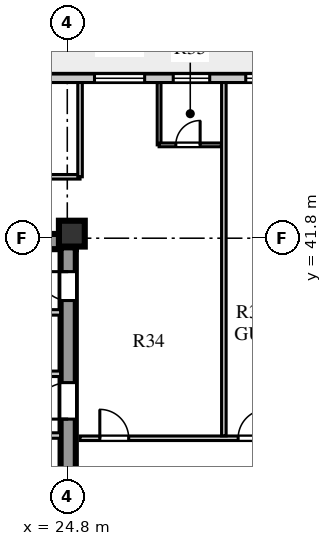
"""IFC4 building model, lengths in metres.
Left out: names, types, materials, properties, quantities, classifications, styles, units other than length and angle.
Written with IfcOpenShell. Run it as: python <this file> out.ifc"""

import sys

from ifc_helpers import new_model, si_unit, direction, frame, frame_2d, origin, origin_2d, place, context, subcontext, project, spatial, rectangle, extrude, element, fill, save


model = new_model("IFC4")
c1 = context("Model", 3, precision=1e-05, world=origin(), true_north=direction((0.0, 1.0)))
c2 = subcontext(c1, "Body", "Model", "MODEL_VIEW")
j1 = project(units=[si_unit("LENGTHUNIT", "METRE"), si_unit("PLANEANGLEUNIT", "RADIAN")], contexts=[c1])
p1 = place(None, origin())
s1 = spatial("IfcSite", under=j1, at=p1, CompositionType="ELEMENT")
p2 = place(p1, origin())
s2 = spatial("IfcBuilding", under=s1, at=p2, CompositionType="ELEMENT")
p3 = place(p2, frame((0.0, 0.0, 134.8)))
s3 = spatial("IfcBuildingStorey", under=s2, at=p3, CompositionType="ELEMENT", Elevation=134.8)
p4 = place(p3, frame((15.4, 41.69, 0.0), z_axis=(0.0, 0.0, 1.0), x_axis=(1.0, 0.0, 0.0)))
e1 = element("IfcWall", 1, at=p4, inside=s3, PredefinedType="SHEAR", context=c2, shape_type="SweptSolid", body=[
    extrude(rectangle(XDim=9.68, YDim=0.5, at=frame_2d((4.84, 0.0))), origin(), (0.0, 0.0, 1.0), 3.6),
])
p5 = place(p3, frame((24.83, 15.74, 0.0), z_axis=(0.0, 0.0, 1.0), x_axis=(0.0, 1.0, 0.0)))
e2 = element("IfcWall", 2, at=p5, inside=s3, PredefinedType="SHEAR", context=c2, shape_type="SweptSolid", body=[
    extrude(rectangle(XDim=25.76, YDim=0.5, at=frame_2d((12.88, 0.0))), origin(), (0.0, 0.0, 1.0), 3.6),
])
p6 = place(p5, frame((1.61, 0.0, 0.0)))
e3 = element("IfcOpeningElement", 3, at=p6, cuts=e2, PredefinedType="OPENING", context=c2, shape_type="SweptSolid", body=[
    extrude(rectangle(XDim=1.2, YDim=2.1, at=frame_2d((0.6, 1.05))), frame((0.0, 0.26, 0.0), z_axis=(0.0, -1.0, 0.0), x_axis=(1.0, 0.0, 0.0)), (0.0, 0.0, 1.0), 0.52),
])
p7 = place(p5, frame((6.78, 0.0, 0.0)))
e4 = element("IfcOpeningElement", 4, at=p7, cuts=e2, PredefinedType="OPENING", context=c2, shape_type="SweptSolid", body=[
    extrude(rectangle(XDim=0.85, YDim=2.06, at=frame_2d((0.425, 1.03))), frame((0.0, 0.26, 0.0), z_axis=(0.0, -1.0, 0.0), x_axis=(1.0, 0.0, 0.0)), (0.0, 0.0, 1.0), 0.52),
])
p8 = place(p5, frame((12.11, 0.0, 0.0)))
e5 = element("IfcOpeningElement", 5, at=p8, cuts=e2, PredefinedType="OPENING", context=c2, shape_type="SweptSolid", body=[
    extrude(rectangle(XDim=1.5, YDim=2.12, at=frame_2d((0.75, 1.06))), frame((0.0, 0.26, 0.0), z_axis=(0.0, -1.0, 0.0), x_axis=(1.0, 0.0, 0.0)), (0.0, 0.0, 1.0), 0.52),
])
p9 = place(p5, frame((20.11, 0.0, 0.0)))
e6 = element("IfcOpeningElement", 6, at=p9, cuts=e2, PredefinedType="OPENING", context=c2, shape_type="SweptSolid", body=[
    extrude(rectangle(XDim=1.2, YDim=2.12, at=frame_2d((0.6, 1.06))), frame((0.0, 0.26, 0.0), z_axis=(0.0, -1.0, 0.0), x_axis=(1.0, 0.0, 0.0)), (0.0, 0.0, 1.0), 0.52),
])
p10 = place(p5, frame((24.01, 0.0, 0.0)))
e7 = element("IfcOpeningElement", 7, at=p10, cuts=e2, PredefinedType="OPENING", context=c2, shape_type="SweptSolid", body=[
    extrude(rectangle(XDim=0.95, YDim=2.1, at=frame_2d((0.475, 1.05))), frame((0.0, 0.26, 0.0), z_axis=(0.0, -1.0, 0.0), x_axis=(1.0, 0.0, 0.0)), (0.0, 0.0, 1.0), 0.52),
])
p11 = place(p3, frame((24.95, 41.95, 0.0), z_axis=(0.0, 0.0, 1.0), x_axis=(1.0, 0.0, 0.0)))
e8 = element("IfcColumn", 8, at=p11, inside=s3, PredefinedType="COLUMN", context=c2, shape_type="SweptSolid", body=[
    extrude(rectangle(XDim=0.85, YDim=0.85, at=origin_2d()), origin(), (0.0, 0.0, 1.0), 3.6),
])
p12 = place(p3, frame((45.35, 47.06, 0.0), z_axis=(0.0, 0.0, 1.0), x_axis=(-1.0, 0.0, 0.0)))
e9 = element("IfcWall", 9, at=p12, inside=s3, PredefinedType="STANDARD", context=c2, shape_type="SweptSolid", body=[
    extrude(rectangle(XDim=32.1, YDim=0.28, at=frame_2d((16.05, 0.0))), origin(), (0.0, 0.0, 1.0), 3.6),
])
p13 = place(p12, frame((30.15, 0.0, 0.0)))
e10 = element("IfcOpeningElement", 10, at=p13, cuts=e9, PredefinedType="OPENING", context=c2, shape_type="SweptSolid", body=[
    extrude(rectangle(XDim=1.0, YDim=2.05, at=frame_2d((0.5, 1.025))), frame((0.0, 0.15, 0.0), z_axis=(0.0, -1.0, 0.0), x_axis=(1.0, 0.0, 0.0)), (0.0, 0.0, 1.0), 0.3),
])
p14 = place(p12, frame((24.495, 0.0, 0.8)))
e11 = element("IfcOpeningElement", 11, at=p14, cuts=e9, PredefinedType="OPENING", context=c2, shape_type="SweptSolid", body=[
    extrude(rectangle(XDim=1.35, YDim=1.9, at=frame_2d((0.675, 0.95))), frame((0.0, 0.15, 0.0), z_axis=(0.0, -1.0, 0.0), x_axis=(1.0, 0.0, 0.0)), (0.0, 0.0, 1.0), 0.3),
])
p15 = place(p12, frame((18.005, 0.0, 0.8)))
e12 = element("IfcOpeningElement", 12, at=p15, cuts=e9, PredefinedType="OPENING", context=c2, shape_type="SweptSolid", body=[
    extrude(rectangle(XDim=1.65, YDim=1.95, at=frame_2d((0.825, 0.975))), frame((0.0, 0.15, 0.0), z_axis=(0.0, -1.0, 0.0), x_axis=(1.0, 0.0, 0.0)), (0.0, 0.0, 1.0), 0.3),
])
p16 = place(p12, frame((15.865, 0.0, 0.8)))
e13 = element("IfcOpeningElement", 13, at=p16, cuts=e9, PredefinedType="OPENING", context=c2, shape_type="SweptSolid", body=[
    extrude(rectangle(XDim=1.2, YDim=1.75, at=frame_2d((0.6, 0.875))), frame((0.0, 0.15, 0.0), z_axis=(0.0, -1.0, 0.0), x_axis=(1.0, 0.0, 0.0)), (0.0, 0.0, 1.0), 0.3),
])
p17 = place(p12, frame((13.48, 0.0, 0.8)))
e14 = element("IfcOpeningElement", 14, at=p17, cuts=e9, PredefinedType="OPENING", context=c2, shape_type="SweptSolid", body=[
    extrude(rectangle(XDim=1.2, YDim=1.75, at=frame_2d((0.6, 0.875))), frame((0.0, 0.15, 0.0), z_axis=(0.0, -1.0, 0.0), x_axis=(1.0, 0.0, 0.0)), (0.0, 0.0, 1.0), 0.3),
])
p18 = place(p12, frame((11.095, 0.0, 0.8)))
e15 = element("IfcOpeningElement", 15, at=p18, cuts=e9, PredefinedType="OPENING", context=c2, shape_type="SweptSolid", body=[
    extrude(rectangle(XDim=1.2, YDim=1.75, at=frame_2d((0.6, 0.875))), frame((0.0, 0.15, 0.0), z_axis=(0.0, -1.0, 0.0), x_axis=(1.0, 0.0, 0.0)), (0.0, 0.0, 1.0), 0.3),
])
p19 = place(p12, frame((6.83, 0.0, 0.8)))
e16 = element("IfcOpeningElement", 16, at=p19, cuts=e9, PredefinedType="OPENING", context=c2, shape_type="SweptSolid", body=[
    extrude(rectangle(XDim=1.5, YDim=2.0, at=frame_2d((0.75, 1.0))), frame((0.0, 0.15, 0.0), z_axis=(0.0, -1.0, 0.0), x_axis=(1.0, 0.0, 0.0)), (0.0, 0.0, 1.0), 0.3),
])
p20 = place(p12, frame((1.72, 0.0, 0.8)))
e17 = element("IfcOpeningElement", 17, at=p20, cuts=e9, PredefinedType="OPENING", context=c2, shape_type="SweptSolid", body=[
    extrude(rectangle(XDim=1.2, YDim=1.75, at=frame_2d((0.6, 0.875))), frame((0.0, 0.15, 0.0), z_axis=(0.0, -1.0, 0.0), x_axis=(1.0, 0.0, 0.0)), (0.0, 0.0, 1.0), 0.3),
])
p21 = place(p3, frame((22.02, 35.31, 0.0), z_axis=(0.0, 0.0, 1.0), x_axis=(1.0, 0.0, 0.0)))
e18 = element("IfcWall", 18, at=p21, inside=s3, PredefinedType="SOLIDWALL", context=c2, shape_type="SweptSolid", body=[
    extrude(rectangle(XDim=2.56, YDim=0.18, at=frame_2d((1.28, 0.0))), origin(), (0.0, 0.0, 1.0), 3.6),
])
p22 = place(p21, frame((0.55, 0.0, 0.0)))
e19 = element("IfcOpeningElement", 19, at=p22, cuts=e18, PredefinedType="OPENING", context=c2, shape_type="SweptSolid", body=[
    extrude(rectangle(XDim=1.0, YDim=2.1, at=frame_2d((0.5, 1.05))), frame((0.0, 0.1, 0.0), z_axis=(0.0, -1.0, 0.0), x_axis=(1.0, 0.0, 0.0)), (0.0, 0.0, 1.0), 0.2),
])
p23 = place(p3, frame((19.64, 37.34, 0.0), z_axis=(0.0, 0.0, 1.0), x_axis=(1.0, 0.0, 0.0)))
e20 = element("IfcWall", 20, at=p23, inside=s3, PredefinedType="SOLIDWALL", context=c2, shape_type="SweptSolid", body=[
    extrude(rectangle(XDim=4.94, YDim=0.18, at=frame_2d((2.47, 0.0))), origin(), (0.0, 0.0, 1.0), 3.6),
])
p24 = place(p23, frame((0.45, 0.0, 0.0)))
e21 = element("IfcOpeningElement", 21, at=p24, cuts=e20, PredefinedType="OPENING", context=c2, shape_type="SweptSolid", body=[
    extrude(rectangle(XDim=1.0, YDim=2.1, at=frame_2d((0.5, 1.05))), frame((0.0, 0.1, 0.0), z_axis=(0.0, -1.0, 0.0), x_axis=(1.0, 0.0, 0.0)), (0.0, 0.0, 1.0), 0.2),
])
p25 = place(p23, frame((2.5, 0.0, 0.0)))
e22 = element("IfcOpeningElement", 22, at=p25, cuts=e20, PredefinedType="OPENING", context=c2, shape_type="SweptSolid", body=[
    extrude(rectangle(XDim=1.0, YDim=2.1, at=frame_2d((0.5, 1.05))), frame((0.0, 0.1, 0.0), z_axis=(0.0, -1.0, 0.0), x_axis=(1.0, 0.0, 0.0)), (0.0, 0.0, 1.0), 0.2),
])
p26 = place(p3, frame((19.64, 39.36, 0.0), z_axis=(0.0, 0.0, 1.0), x_axis=(1.0, 0.0, 0.0)))
e23 = element("IfcWall", 23, at=p26, inside=s3, PredefinedType="SOLIDWALL", context=c2, shape_type="SweptSolid", body=[
    extrude(rectangle(XDim=4.94, YDim=0.18, at=frame_2d((2.47, 0.0))), origin(), (0.0, 0.0, 1.0), 3.6),
])
p27 = place(p3, frame((25.22, 35.22, 0.0), z_axis=(0.0, 0.0, 1.0), x_axis=(1.0, 0.0, 0.0)))
e24 = element("IfcWall", 24, at=p27, inside=s3, PredefinedType="PARTITIONING", context=c2, shape_type="SweptSolid", body=[
    extrude(rectangle(XDim=9.5, YDim=0.15, at=frame_2d((4.75, 0.0))), origin(), (0.0, 0.0, 1.0), 3.6),
])
p28 = place(p27, frame((0.65, 0.0, 0.0)))
e25 = element("IfcOpeningElement", 25, at=p28, cuts=e24, PredefinedType="OPENING", context=c2, shape_type="SweptSolid", body=[
    extrude(rectangle(XDim=0.95, YDim=2.1, at=frame_2d((0.475, 1.05))), frame((0.0, 0.085, 0.0), z_axis=(0.0, -1.0, 0.0), x_axis=(1.0, 0.0, 0.0)), (0.0, 0.0, 1.0), 0.17),
])
p29 = place(p27, frame((5.2, 0.0, 0.0)))
e26 = element("IfcOpeningElement", 26, at=p29, cuts=e24, PredefinedType="OPENING", context=c2, shape_type="SweptSolid", body=[
    extrude(rectangle(XDim=0.95, YDim=2.1, at=frame_2d((0.475, 1.05))), frame((0.0, 0.085, 0.0), z_axis=(0.0, -1.0, 0.0), x_axis=(1.0, 0.0, 0.0)), (0.0, 0.0, 1.0), 0.17),
])
p30 = place(p3, frame((13.59, 43.82, 0.0), z_axis=(0.0, 0.0, 1.0), x_axis=(1.0, 0.0, 0.0)))
e27 = element("IfcWall", 27, at=p30, inside=s3, PredefinedType="PARTITIONING", context=c2, shape_type="SweptSolid", body=[
    extrude(rectangle(XDim=11.63, YDim=0.15, at=frame_2d((5.815, 0.0))), origin(), (0.0, 0.0, 1.0), 3.6),
])
p31 = place(p30, frame((4.56, 0.0, 0.0)))
e28 = element("IfcOpeningElement", 28, at=p31, cuts=e27, PredefinedType="OPENING", context=c2, shape_type="SweptSolid", body=[
    extrude(rectangle(XDim=1.0, YDim=2.08, at=frame_2d((0.5, 1.04))), frame((0.0, 0.085, 0.0), z_axis=(0.0, -1.0, 0.0), x_axis=(1.0, 0.0, 0.0)), (0.0, 0.0, 1.0), 0.17),
])
p32 = place(p3, frame((25.22, 43.82, 0.0), z_axis=(0.0, 0.0, 1.0), x_axis=(0.0, 1.0, 0.0)))
e29 = element("IfcWall", 29, at=p32, inside=s3, PredefinedType="PARTITIONING", context=c2, shape_type="SweptSolid", body=[
    extrude(rectangle(XDim=3.1, YDim=0.15, at=frame_2d((1.55, 0.0))), origin(), (0.0, 0.0, 1.0), 3.1),
])
p33 = place(p3, frame((29.95, 35.3, 0.0), z_axis=(0.0, 0.0, 1.0), x_axis=(0.0, 1.0, 0.0)))
e30 = element("IfcWall", 30, at=p33, inside=s3, PredefinedType="PARTITIONING", context=c2, shape_type="SweptSolid", body=[
    extrude(rectangle(XDim=11.62, YDim=0.15, at=frame_2d((5.81, 0.0))), origin(), (0.0, 0.0, 1.0), 3.6),
])
p34 = place(p3, frame((27.82, 44.87, 0.0), z_axis=(0.0, 0.0, 1.0), x_axis=(0.0, 1.0, 0.0)))
e31 = element("IfcWall", 31, at=p34, inside=s3, PredefinedType="PLUMBINGWALL", context=c2, shape_type="SweptSolid", body=[
    extrude(rectangle(XDim=2.05, YDim=0.125, at=frame_2d((1.025, 0.0))), origin(), (0.0, 0.0, 1.0), 3.6),
])
p35 = place(p3, frame((27.82, 44.87, 0.0), z_axis=(0.0, 0.0, 1.0), x_axis=(1.0, 0.0, 0.0)))
e32 = element("IfcWall", 32, at=p35, inside=s3, PredefinedType="PLUMBINGWALL", context=c2, shape_type="SweptSolid", body=[
    extrude(rectangle(XDim=2.05, YDim=0.125, at=frame_2d((1.025, 0.0))), origin(), (0.0, 0.0, 1.0), 3.6),
])
p36 = place(p35, frame((0.55, 0.0, 0.0)))
e33 = element("IfcOpeningElement", 33, at=p36, cuts=e32, PredefinedType="OPENING", context=c2, shape_type="SweptSolid", body=[
    extrude(rectangle(XDim=0.8, YDim=2.05, at=frame_2d((0.4, 1.025))), frame((0.0, 0.073, 0.0), z_axis=(0.0, -1.0, 0.0), x_axis=(1.0, 0.0, 0.0)), (0.0, 0.0, 1.0), 0.145),
])
p37 = place(p15, origin())
e34 = element("IfcWindow", 34, at=p37, inside=s3, PartitioningType="SINGLE_PANEL", PredefinedType="WINDOW", context=c2, shape_type="SweptSolid", body=[
    extrude(rectangle(XDim=1.65, YDim=1.95, at=frame_2d((0.825, 0.975))), frame((0.0, 0.03, 0.0), z_axis=(0.0, -1.0, 0.0), x_axis=(1.0, 0.0, 0.0)), (0.0, 0.0, 1.0), 0.06),
])
fill(e12, e34)
p38 = place(p16, origin())
e35 = element("IfcWindow", 35, at=p38, inside=s3, PartitioningType="SINGLE_PANEL", PredefinedType="WINDOW", context=c2, shape_type="SweptSolid", body=[
    extrude(rectangle(XDim=1.2, YDim=1.75, at=frame_2d((0.6, 0.875))), frame((0.0, 0.03, 0.0), z_axis=(0.0, -1.0, 0.0), x_axis=(1.0, 0.0, 0.0)), (0.0, 0.0, 1.0), 0.06),
])
fill(e13, e35)
p39 = place(p17, origin())
e36 = element("IfcWindow", 36, at=p39, inside=s3, PartitioningType="SINGLE_PANEL", PredefinedType="WINDOW", context=c2, shape_type="SweptSolid", body=[
    extrude(rectangle(XDim=1.2, YDim=1.75, at=frame_2d((0.6, 0.875))), frame((0.0, 0.03, 0.0), z_axis=(0.0, -1.0, 0.0), x_axis=(1.0, 0.0, 0.0)), (0.0, 0.0, 1.0), 0.06),
])
fill(e14, e36)
p40 = place(p9, frame((1.2, 0.0, 0.0), z_axis=(0.0, 0.0, 1.0), x_axis=(-1.0, 0.0, 0.0)))
e37 = element("IfcDoor", 37, at=p40, inside=s3, OperationType="SINGLE_SWING_RIGHT", PredefinedType="DOOR", context=c2, shape_type="SweptSolid", body=[
    extrude(rectangle(XDim=1.2, YDim=2.12, at=frame_2d((0.6, 1.06))), frame((0.0, 0.025, 0.0), z_axis=(0.0, -1.0, 0.0), x_axis=(1.0, 0.0, 0.0)), (0.0, 0.0, 1.0), 0.05),
])
fill(e6, e37)
p41 = place(p10, frame((0.95, 0.0, 0.0), z_axis=(0.0, 0.0, 1.0), x_axis=(-1.0, 0.0, 0.0)))
e38 = element("IfcDoor", 38, at=p41, inside=s3, OperationType="SINGLE_SWING_LEFT", PredefinedType="DOOR", context=c2, shape_type="SweptSolid", body=[
    extrude(rectangle(XDim=0.95, YDim=2.1, at=frame_2d((0.475, 1.05))), frame((0.0, 0.025, 0.0), z_axis=(0.0, -1.0, 0.0), x_axis=(1.0, 0.0, 0.0)), (0.0, 0.0, 1.0), 0.05),
])
fill(e7, e38)
p42 = place(p28, origin())
e39 = element("IfcDoor", 39, at=p42, inside=s3, OperationType="SINGLE_SWING_LEFT", PredefinedType="DOOR", context=c2, shape_type="SweptSolid", body=[
    extrude(rectangle(XDim=0.95, YDim=2.1, at=frame_2d((0.475, 1.05))), frame((0.0, 0.025, 0.0), z_axis=(0.0, -1.0, 0.0), x_axis=(1.0, 0.0, 0.0)), (0.0, 0.0, 1.0), 0.05),
])
fill(e25, e39)
p43 = place(p36, frame((0.8, 0.0, 0.0), z_axis=(0.0, 0.0, 1.0), x_axis=(-1.0, 0.0, 0.0)))
e40 = element("IfcDoor", 40, at=p43, inside=s3, OperationType="SINGLE_SWING_LEFT", PredefinedType="DOOR", context=c2, shape_type="SweptSolid", body=[
    extrude(rectangle(XDim=0.8, YDim=2.05, at=frame_2d((0.4, 1.025))), frame((0.0, 0.025, 0.0), z_axis=(0.0, -1.0, 0.0), x_axis=(1.0, 0.0, 0.0)), (0.0, 0.0, 1.0), 0.05),
])
fill(e33, e40)
p44 = place(p29, origin())
e41 = element("IfcDoor", 41, at=p44, inside=s3, OperationType="SINGLE_SWING_RIGHT", PredefinedType="DOOR", context=c2, shape_type="SweptSolid", body=[
    extrude(rectangle(XDim=0.95, YDim=2.1, at=frame_2d((0.475, 1.05))), frame((0.0, 0.025, 0.0), z_axis=(0.0, -1.0, 0.0), x_axis=(1.0, 0.0, 0.0)), (0.0, 0.0, 1.0), 0.05),
])
fill(e26, e41)
save(model, sys.argv[1])
